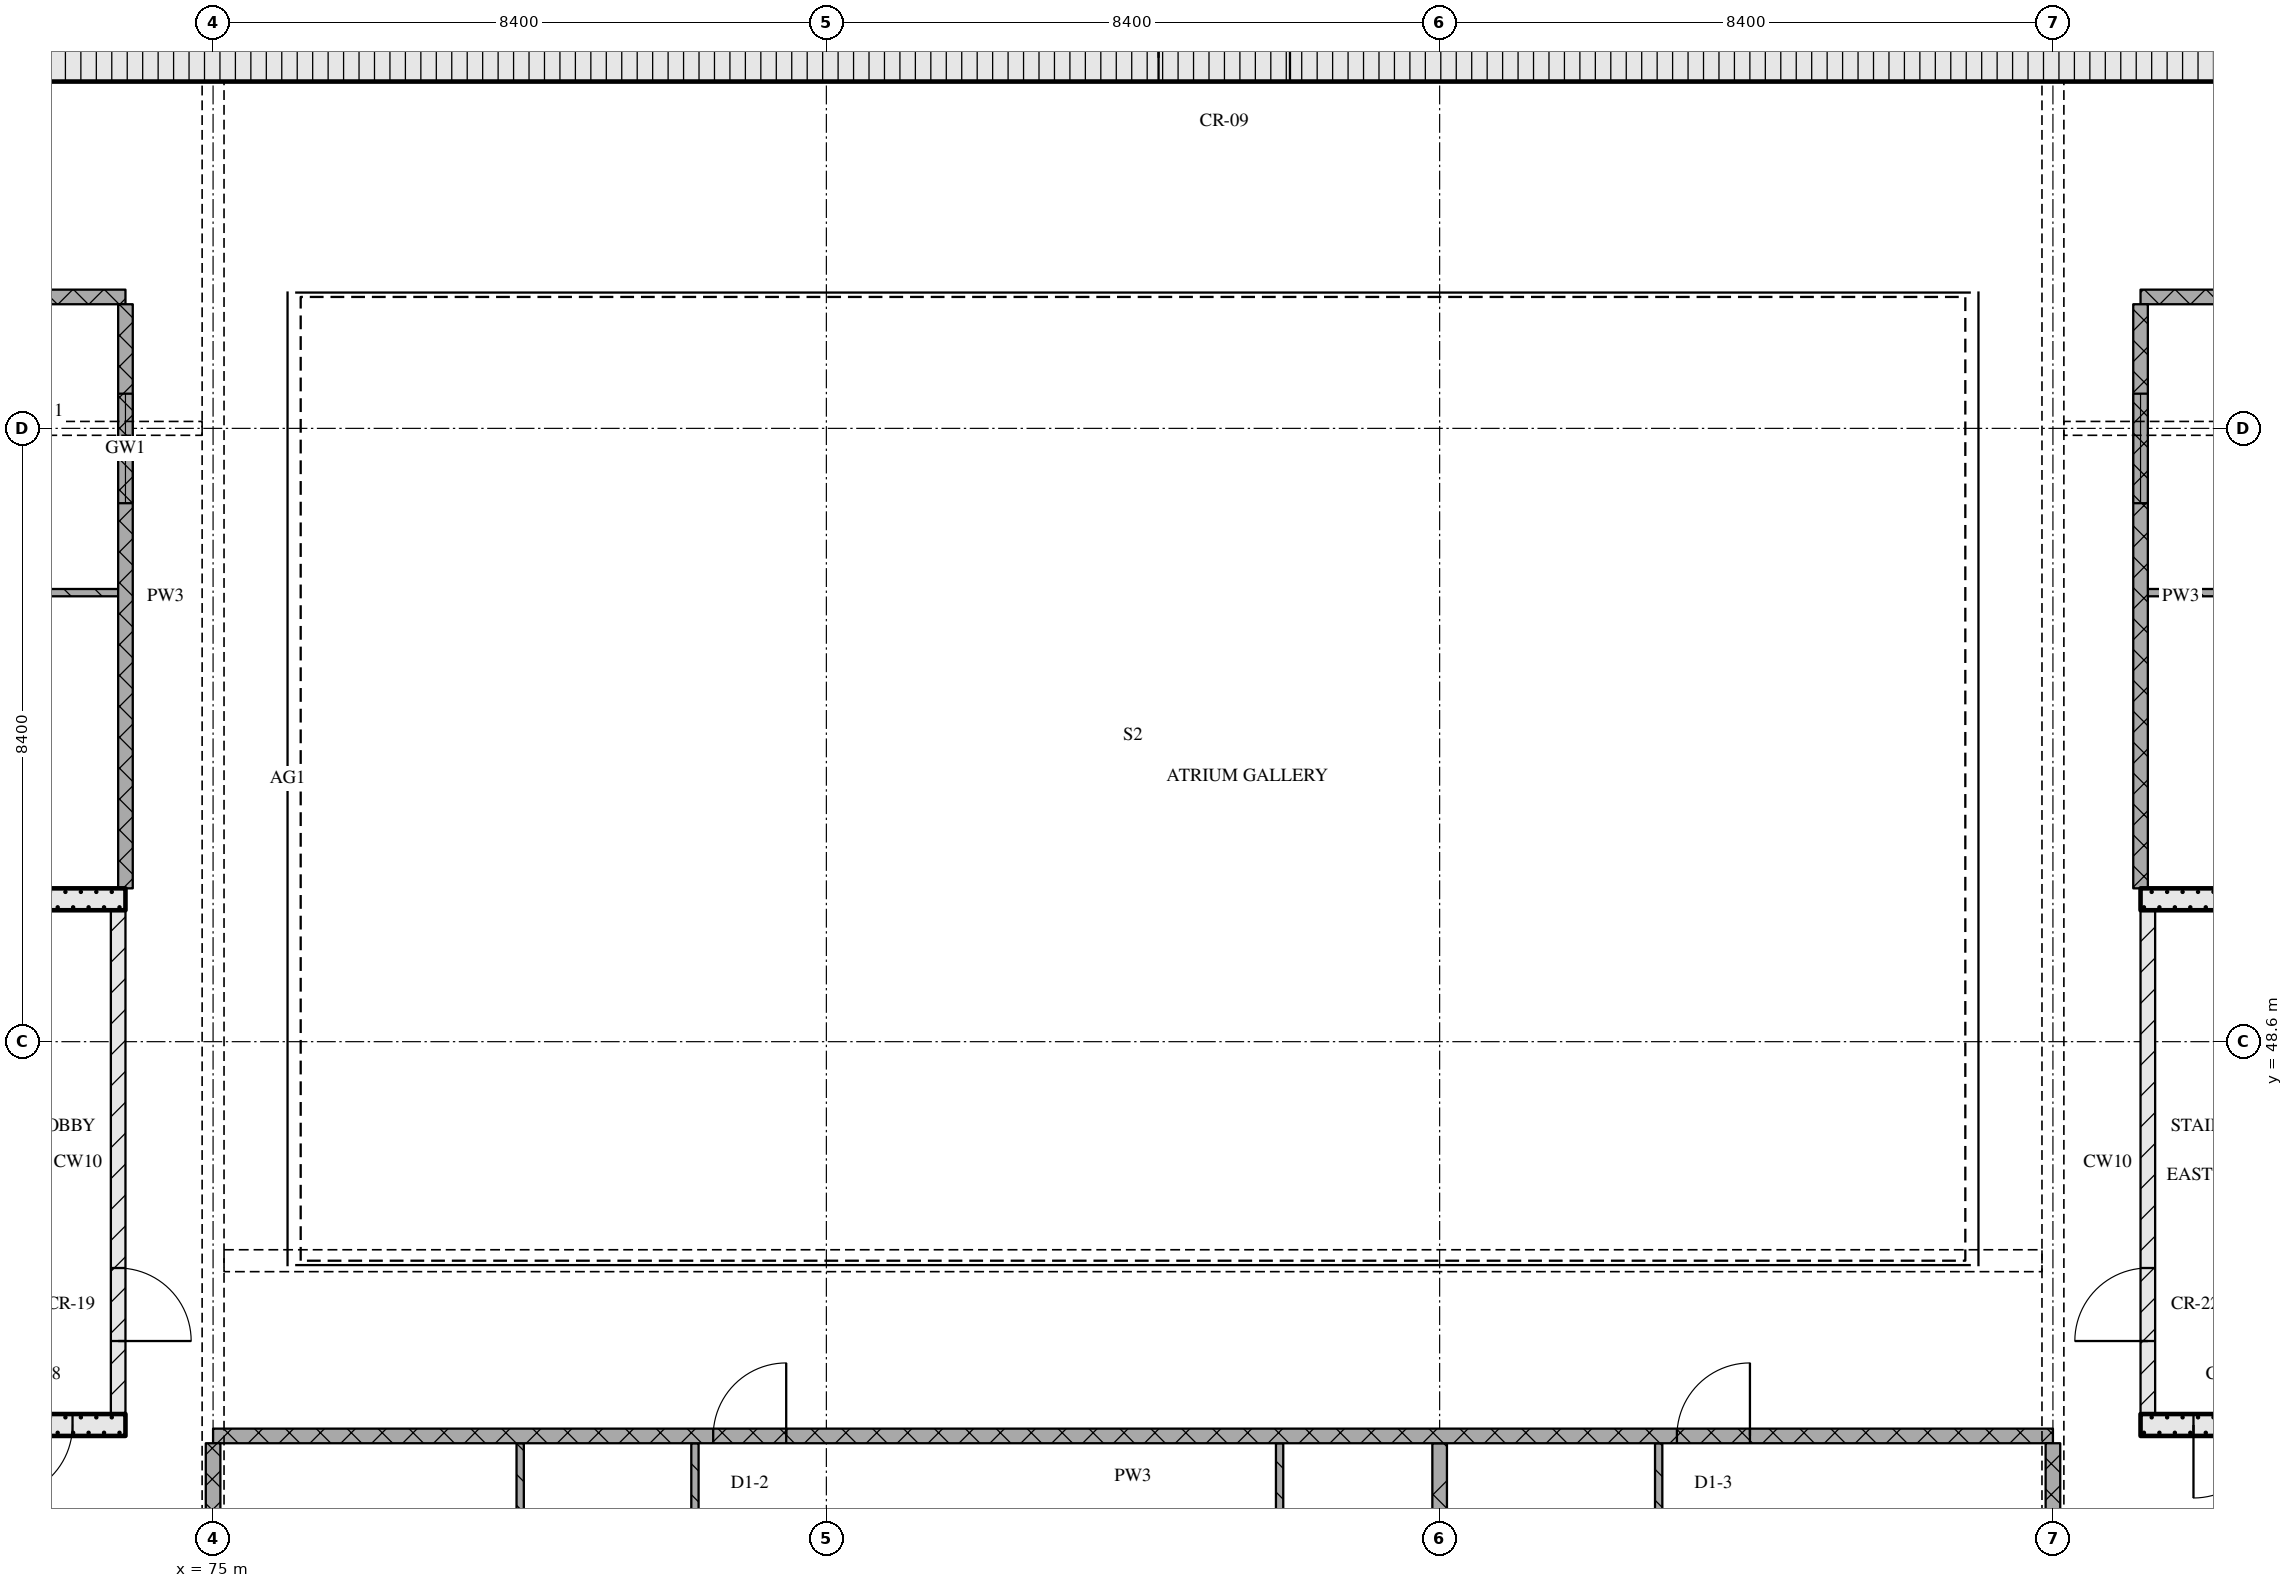
"""IFC4 building model, lengths in metres.
Left out: names, types, materials, properties, quantities, classifications, styles, units other than length and angle.
Written with IfcOpenShell. Run it as: python <this file> out.ifc"""

import sys

from ifc_helpers import new_model, si_unit, direction, frame, frame_2d, origin, place, context, subcontext, project, spatial, rectangle, extrude, element, fill, save


model = new_model("IFC4")
c1 = context("Model", 3, precision=1e-05, world=origin(), true_north=direction((0.0, 1.0)))
c2 = subcontext(c1, "Body", "Model", "MODEL_VIEW")
j1 = project(units=[si_unit("LENGTHUNIT", "METRE"), si_unit("PLANEANGLEUNIT", "RADIAN")], contexts=[c1])
p1 = place(None, origin())
s1 = spatial("IfcSite", under=j1, at=p1, CompositionType="ELEMENT")
p2 = place(p1, origin())
s2 = spatial("IfcBuilding", under=s1, at=p2, CompositionType="ELEMENT")
p3 = place(p2, frame((0.0, 0.0, 205.5)))
s3 = spatial("IfcBuildingStorey", under=s2, at=p3, CompositionType="ELEMENT", Elevation=205.5)
p4 = place(p3, frame((67.15, 62.075, 0.0), z_axis=(0.0, 0.0, 1.0), x_axis=(1.0, 0.0, 0.0)))
e1 = element("IfcWall", 1, at=p4, inside=s3, PredefinedType="SOLIDWALL", context=c2, shape_type="SweptSolid", body=[
    extrude(rectangle(XDim=40.9, YDim=0.65, at=frame_2d((20.45, 0.0))), origin(), (0.0, 0.0, 1.0), 3.32),
])
p5 = place(p4, frame((20.8, 0.0, 0.0)))
e2 = element("IfcOpeningElement", 2, at=p5, cuts=e1, PredefinedType="OPENING", context=c2, shape_type="SweptSolid", body=[
    extrude(rectangle(XDim=1.8, YDim=2.1, at=frame_2d((0.9, 1.05))), frame((0.0, 0.335, 0.0), z_axis=(0.0, -1.0, 0.0), x_axis=(1.0, 0.0, 0.0)), (0.0, 0.0, 1.0), 0.67),
])
p6 = place(p3, frame((68.2, 43.35, 0.0), z_axis=(0.0, 0.0, 1.0), x_axis=(1.0, 0.0, 0.0)))
e3 = element("IfcWall", 3, at=p6, inside=s3, PredefinedType="SOLIDWALL", context=c2, shape_type="SweptSolid", body=[
    extrude(rectangle(XDim=5.6, YDim=0.3, at=frame_2d((2.8, 0.0))), origin(), (0.0, 0.0, 1.0), 3.32),
])
p7 = place(p6, frame((3.875, 0.0, 0.0)))
e4 = element("IfcOpeningElement", 4, at=p7, cuts=e3, PredefinedType="OPENING", context=c2, shape_type="SweptSolid", body=[
    extrude(rectangle(XDim=1.0, YDim=2.1, at=frame_2d((0.5, 1.05))), frame((0.0, 0.16, 0.0), z_axis=(0.0, -1.0, 0.0), x_axis=(1.0, 0.0, 0.0)), (0.0, 0.0, 1.0), 0.32),
])
p8 = place(p3, frame((73.7, 43.5, 0.0), z_axis=(0.0, 0.0, 1.0), x_axis=(0.0, 1.0, 0.0)))
e5 = element("IfcWall", 5, at=p8, inside=s3, PredefinedType="PARTITIONING", context=c2, shape_type="SweptSolid", body=[
    extrude(rectangle(XDim=6.9, YDim=0.2, at=frame_2d((3.45, 0.0))), origin(), (0.0, 0.0, 1.0), 3.32),
])
p9 = place(p8, frame((1.0, 0.0, 0.0)))
e6 = element("IfcOpeningElement", 6, at=p9, cuts=e5, PredefinedType="OPENING", context=c2, shape_type="SweptSolid", body=[
    extrude(rectangle(XDim=1.0, YDim=2.1, at=frame_2d((0.5, 1.05))), frame((0.0, 0.11, 0.0), z_axis=(0.0, -1.0, 0.0), x_axis=(1.0, 0.0, 0.0)), (0.0, 0.0, 1.0), 0.22),
])
p10 = place(p3, frame((68.2, 50.55, 0.0), z_axis=(0.0, 0.0, 1.0), x_axis=(1.0, 0.0, 0.0)))
e7 = element("IfcWall", 7, at=p10, inside=s3, PredefinedType="SOLIDWALL", context=c2, shape_type="SweptSolid", body=[
    extrude(rectangle(XDim=5.6, YDim=0.3, at=frame_2d((2.8, 0.0))), origin(), (0.0, 0.0, 1.0), 3.32),
])
p11 = place(p3, frame((101.4, 43.35, 0.0), z_axis=(0.0, 0.0, 1.0), x_axis=(1.0, 0.0, 0.0)))
e8 = element("IfcWall", 8, at=p11, inside=s3, PredefinedType="SOLIDWALL", context=c2, shape_type="SweptSolid", body=[
    extrude(rectangle(XDim=5.6, YDim=0.3, at=frame_2d((2.8, 0.0))), origin(), (0.0, 0.0, 1.0), 3.32),
])
p12 = place(p11, frame((0.725, 0.0, 0.0)))
e9 = element("IfcOpeningElement", 9, at=p12, cuts=e8, PredefinedType="OPENING", context=c2, shape_type="SweptSolid", body=[
    extrude(rectangle(XDim=1.0, YDim=2.1, at=frame_2d((0.5, 1.05))), frame((0.0, 0.16, 0.0), z_axis=(0.0, -1.0, 0.0), x_axis=(1.0, 0.0, 0.0)), (0.0, 0.0, 1.0), 0.32),
])
p13 = place(p3, frame((101.5, 43.5, 0.0), z_axis=(0.0, 0.0, 1.0), x_axis=(0.0, 1.0, 0.0)))
e10 = element("IfcWall", 10, at=p13, inside=s3, PredefinedType="PARTITIONING", context=c2, shape_type="SweptSolid", body=[
    extrude(rectangle(XDim=6.9, YDim=0.2, at=frame_2d((3.45, 0.0))), origin(), (0.0, 0.0, 1.0), 3.32),
])
p14 = place(p13, frame((1.0, 0.0, 0.0)))
e11 = element("IfcOpeningElement", 11, at=p14, cuts=e10, PredefinedType="OPENING", context=c2, shape_type="SweptSolid", body=[
    extrude(rectangle(XDim=1.0, YDim=2.1, at=frame_2d((0.5, 1.05))), frame((0.0, 0.11, 0.0), z_axis=(0.0, -1.0, 0.0), x_axis=(1.0, 0.0, 0.0)), (0.0, 0.0, 1.0), 0.22),
])
p15 = place(p3, frame((101.4, 50.55, 0.0), z_axis=(0.0, 0.0, 1.0), x_axis=(1.0, 0.0, 0.0)))
e12 = element("IfcWall", 12, at=p15, inside=s3, PredefinedType="SOLIDWALL", context=c2, shape_type="SweptSolid", body=[
    extrude(rectangle(XDim=5.6, YDim=0.3, at=frame_2d((2.8, 0.0))), origin(), (0.0, 0.0, 1.0), 3.32),
])
p16 = place(p3, frame((100.2, 43.2, 0.0), z_axis=(0.0, 0.0, 1.0), x_axis=(-1.0, 0.0, 0.0)))
e13 = element("IfcWall", 13, at=p16, inside=s3, PredefinedType="PARTITIONING", context=c2, shape_type="SweptSolid", body=[
    extrude(rectangle(XDim=25.2, YDim=0.2, at=frame_2d((12.6, 0.0))), origin(), (0.0, 0.0, 1.0), 3.32),
])
p17 = place(p16, frame((4.15, 0.0, 0.0)))
e14 = element("IfcOpeningElement", 14, at=p17, cuts=e13, PredefinedType="OPENING", context=c2, shape_type="SweptSolid", body=[
    extrude(rectangle(XDim=1.0, YDim=2.1, at=frame_2d((0.5, 1.05))), frame((0.0, 0.11, 0.0), z_axis=(0.0, -1.0, 0.0), x_axis=(1.0, 0.0, 0.0)), (0.0, 0.0, 1.0), 0.22),
])
p18 = place(p16, frame((17.35, 0.0, 0.0)))
e15 = element("IfcOpeningElement", 15, at=p18, cuts=e13, PredefinedType="OPENING", context=c2, shape_type="SweptSolid", body=[
    extrude(rectangle(XDim=1.0, YDim=2.1, at=frame_2d((0.5, 1.05))), frame((0.0, 0.11, 0.0), z_axis=(0.0, -1.0, 0.0), x_axis=(1.0, 0.0, 0.0)), (0.0, 0.0, 1.0), 0.22),
])
p19 = place(p3, frame((69.3, 54.75, 0.0), z_axis=(0.0, 0.0, 1.0), x_axis=(1.0, 0.0, 0.0)))
e16 = element("IfcWall", 16, at=p19, inside=s3, PredefinedType="PARTITIONING", context=c2, shape_type="SweptSolid", body=[
    extrude(rectangle(XDim=4.4, YDim=0.1, at=frame_2d((2.2, 0.0))), origin(), (0.0, 0.0, 1.0), 3.32),
])
p20 = place(p3, frame((101.5, 54.75, 0.0), z_axis=(0.0, 0.0, 1.0), x_axis=(1.0, 0.0, 0.0)))
e17 = element("IfcWall", 17, at=p20, inside=s3, PredefinedType="PARTITIONING", context=c2, shape_type="SweptSolid", body=[
    extrude(rectangle(XDim=6.8, YDim=0.1, at=frame_2d((3.4, 0.0))), origin(), (0.0, 0.0, 1.0), 3.32),
])
p21 = place(p20, frame((2.9, 0.0, 0.0)))
e18 = element("IfcOpeningElement", 18, at=p21, cuts=e17, PredefinedType="OPENING", context=c2, shape_type="SweptSolid", body=[
    extrude(rectangle(XDim=0.9, YDim=2.1, at=frame_2d((0.45, 1.05))), frame((0.0, 0.06, 0.0), z_axis=(0.0, -1.0, 0.0), x_axis=(1.0, 0.0, 0.0)), (0.0, 0.0, 1.0), 0.12),
])
for number, where, z_axis, x_axis in (
    (19, (63.0, 58.8, 0.0), (0.0, 0.0, 1.0), (1.0, 0.0, 0.0)),
    (20, (101.4, 58.8, 0.0), (0.0, 0.0, 1.0), (1.0, 0.0, 0.0)),
):
    element("IfcWall", number, at=place(p3, frame(where, z_axis=z_axis, x_axis=x_axis)), inside=s3, PredefinedType="PARTITIONING", context=c2, shape_type="SweptSolid", body=[
        extrude(rectangle(XDim=10.8, YDim=0.2, at=frame_2d((5.4, 0.0))), origin(), (0.0, 0.0, 1.0), 3.32),
    ])
p22 = place(p3, frame((73.8, 58.7, 0.0), z_axis=(0.0, 0.0, 1.0), x_axis=(0.0, -1.0, 0.0)))
e21 = element("IfcWall", 21, at=p22, inside=s3, PredefinedType="PARTITIONING", context=c2, shape_type="SweptSolid", body=[
    extrude(rectangle(XDim=8.0, YDim=0.2, at=frame_2d((4.0, 0.0))), origin(), (0.0, 0.0, 1.0), 3.32),
])
p23 = place(p22, frame((1.225, 0.0, 0.9)))
e22 = element("IfcOpeningElement", 22, at=p23, cuts=e21, PredefinedType="OPENING", context=c2, shape_type="SweptSolid", body=[
    extrude(rectangle(XDim=1.5, YDim=1.5, at=frame_2d((0.75, 0.75))), frame((0.0, 0.11, 0.0), z_axis=(0.0, -1.0, 0.0), x_axis=(1.0, 0.0, 0.0)), (0.0, 0.0, 1.0), 0.22),
])
p24 = place(p3, frame((75.0, 43.1, 0.0), z_axis=(0.0, 0.0, 1.0), x_axis=(0.0, -1.0, 0.0)))
e23 = element("IfcWall", 23, at=p24, inside=s3, PredefinedType="PARTITIONING", context=c2, shape_type="SweptSolid", body=[
    extrude(rectangle(XDim=2.2, YDim=0.2, at=frame_2d((1.1, 0.0))), origin(), (0.0, 0.0, 1.0), 2.53),
])
p25 = place(p3, frame((79.206, 43.1, 0.0), z_axis=(0.0, 0.0, 1.0), x_axis=(0.0, -1.0, 0.0)))
e24 = element("IfcWall", 24, at=p25, inside=s3, PredefinedType="PARTITIONING", context=c2, shape_type="SweptSolid", body=[
    extrude(rectangle(XDim=6.15, YDim=0.1, at=frame_2d((3.075, 0.0))), origin(), (0.0, 0.0, 1.0), 3.32),
])
p26 = place(p3, frame((81.6, 36.95, 0.0), z_axis=(0.0, 0.0, 1.0), x_axis=(0.0, 1.0, 0.0)))
e25 = element("IfcWall", 25, at=p26, inside=s3, PredefinedType="PARTITIONING", context=c2, shape_type="SweptSolid", body=[
    extrude(rectangle(XDim=6.15, YDim=0.1, at=frame_2d((3.075, 0.0))), origin(), (0.0, 0.0, 1.0), 3.32),
])
p27 = place(p26, frame((2.65, 0.0, 0.0)))
e26 = element("IfcOpeningElement", 26, at=p27, cuts=e25, PredefinedType="OPENING", context=c2, shape_type="SweptSolid", body=[
    extrude(rectangle(XDim=0.9, YDim=2.1, at=frame_2d((0.45, 1.05))), frame((0.0, 0.06, 0.0), z_axis=(0.0, -1.0, 0.0), x_axis=(1.0, 0.0, 0.0)), (0.0, 0.0, 1.0), 0.12),
])
p28 = place(p3, frame((89.608, 43.1, 0.0), z_axis=(0.0, 0.0, 1.0), x_axis=(0.0, -1.0, 0.0)))
e27 = element("IfcWall", 27, at=p28, inside=s3, PredefinedType="PARTITIONING", context=c2, shape_type="SweptSolid", body=[
    extrude(rectangle(XDim=6.15, YDim=0.1, at=frame_2d((3.075, 0.0))), origin(), (0.0, 0.0, 1.0), 3.32),
])
p29 = place(p3, frame((91.8, 43.1, 0.0), z_axis=(0.0, 0.0, 1.0), x_axis=(0.0, -1.0, 0.0)))
e28 = element("IfcWall", 28, at=p29, inside=s3, PredefinedType="PARTITIONING", context=c2, shape_type="SweptSolid", body=[
    extrude(rectangle(XDim=2.58, YDim=0.2, at=frame_2d((1.29, 0.0))), origin(), (0.0, 0.0, 1.0), 3.32),
])
p30 = place(p3, frame((94.8, 43.1, 0.0), z_axis=(0.0, 0.0, 1.0), x_axis=(0.0, -1.0, 0.0)))
e29 = element("IfcWall", 29, at=p30, inside=s3, PredefinedType="PARTITIONING", context=c2, shape_type="SweptSolid", body=[
    extrude(rectangle(XDim=5.55, YDim=0.1, at=frame_2d((2.775, 0.0))), origin(), (0.0, 0.0, 1.0), 3.32),
])
p31 = place(p3, frame((100.2, 43.1, 0.0), z_axis=(0.0, 0.0, 1.0), x_axis=(0.0, -1.0, 0.0)))
e30 = element("IfcWall", 30, at=p31, inside=s3, PredefinedType="PARTITIONING", context=c2, shape_type="SweptSolid", body=[
    extrude(rectangle(XDim=2.2, YDim=0.2, at=frame_2d((1.1, 0.0))), origin(), (0.0, 0.0, 1.0), 2.53),
])
p32 = place(p3, frame((101.4, 58.7, 0.0), z_axis=(0.0, 0.0, 1.0), x_axis=(0.0, -1.0, 0.0)))
e31 = element("IfcWall", 31, at=p32, inside=s3, PredefinedType="PARTITIONING", context=c2, shape_type="SweptSolid", body=[
    extrude(rectangle(XDim=8.0, YDim=0.2, at=frame_2d((4.0, 0.0))), origin(), (0.0, 0.0, 1.0), 3.32),
])
p33 = place(p32, frame((1.225, 0.0, 0.9)))
e32 = element("IfcOpeningElement", 32, at=p33, cuts=e31, PredefinedType="OPENING", context=c2, shape_type="SweptSolid", body=[
    extrude(rectangle(XDim=1.5, YDim=1.5, at=frame_2d((0.75, 0.75))), frame((0.0, 0.11, 0.0), z_axis=(0.0, -1.0, 0.0), x_axis=(1.0, 0.0, 0.0)), (0.0, 0.0, 1.0), 0.22),
])
p34 = place(p5, origin())
e33 = element("IfcDoor", 33, at=p34, inside=s3, OperationType="DOUBLE_DOOR_SINGLE_SWING", PredefinedType="DOOR", context=c2, shape_type="SweptSolid", body=[
    extrude(rectangle(XDim=1.8, YDim=2.1, at=frame_2d((0.9, 1.05))), frame((0.0, 0.025, 0.0), z_axis=(0.0, -1.0, 0.0), x_axis=(1.0, 0.0, 0.0)), (0.0, 0.0, 1.0), 0.05),
])
fill(e2, e33)
p35 = place(p7, origin())
e34 = element("IfcDoor", 34, at=p35, inside=s3, OperationType="SINGLE_SWING_RIGHT", PredefinedType="DOOR", context=c2, shape_type="SweptSolid", body=[
    extrude(rectangle(XDim=1.0, YDim=2.1, at=frame_2d((0.5, 1.05))), frame((0.0, 0.025, 0.0), z_axis=(0.0, -1.0, 0.0), x_axis=(1.0, 0.0, 0.0)), (0.0, 0.0, 1.0), 0.05),
])
fill(e4, e34)
p36 = place(p9, origin())
e35 = element("IfcDoor", 35, at=p36, inside=s3, OperationType="SINGLE_SWING_RIGHT", PredefinedType="DOOR", context=c2, shape_type="SweptSolid", body=[
    extrude(rectangle(XDim=1.0, YDim=2.1, at=frame_2d((0.5, 1.05))), frame((0.0, 0.025, 0.0), z_axis=(0.0, -1.0, 0.0), x_axis=(1.0, 0.0, 0.0)), (0.0, 0.0, 1.0), 0.05),
])
fill(e6, e35)
p37 = place(p12, origin())
e36 = element("IfcDoor", 36, at=p37, inside=s3, OperationType="SINGLE_SWING_RIGHT", PredefinedType="DOOR", context=c2, shape_type="SweptSolid", body=[
    extrude(rectangle(XDim=1.0, YDim=2.1, at=frame_2d((0.5, 1.05))), frame((0.0, 0.025, 0.0), z_axis=(0.0, -1.0, 0.0), x_axis=(1.0, 0.0, 0.0)), (0.0, 0.0, 1.0), 0.05),
])
fill(e9, e36)
p38 = place(p14, origin())
e37 = element("IfcDoor", 37, at=p38, inside=s3, OperationType="SINGLE_SWING_LEFT", PredefinedType="DOOR", context=c2, shape_type="SweptSolid", body=[
    extrude(rectangle(XDim=1.0, YDim=2.1, at=frame_2d((0.5, 1.05))), frame((0.0, 0.025, 0.0), z_axis=(0.0, -1.0, 0.0), x_axis=(1.0, 0.0, 0.0)), (0.0, 0.0, 1.0), 0.05),
])
fill(e11, e37)
p39 = place(p17, origin())
e38 = element("IfcDoor", 38, at=p39, inside=s3, OperationType="SINGLE_SWING_RIGHT", PredefinedType="DOOR", context=c2, shape_type="SweptSolid", body=[
    extrude(rectangle(XDim=1.0, YDim=2.1, at=frame_2d((0.5, 1.05))), frame((0.0, 0.025, 0.0), z_axis=(0.0, -1.0, 0.0), x_axis=(1.0, 0.0, 0.0)), (0.0, 0.0, 1.0), 0.05),
])
fill(e14, e38)
p40 = place(p18, origin())
e39 = element("IfcDoor", 39, at=p40, inside=s3, OperationType="SINGLE_SWING_RIGHT", PredefinedType="DOOR", context=c2, shape_type="SweptSolid", body=[
    extrude(rectangle(XDim=1.0, YDim=2.1, at=frame_2d((0.5, 1.05))), frame((0.0, 0.025, 0.0), z_axis=(0.0, -1.0, 0.0), x_axis=(1.0, 0.0, 0.0)), (0.0, 0.0, 1.0), 0.05),
])
fill(e15, e39)
p41 = place(p23, origin())
e40 = element("IfcWindow", 40, at=p41, inside=s3, PartitioningType="SINGLE_PANEL", PredefinedType="WINDOW", context=c2, shape_type="SweptSolid", body=[
    extrude(rectangle(XDim=1.5, YDim=1.5, at=frame_2d((0.75, 0.75))), frame((0.0, 0.03, 0.0), z_axis=(0.0, -1.0, 0.0), x_axis=(1.0, 0.0, 0.0)), (0.0, 0.0, 1.0), 0.06),
])
fill(e22, e40)
p42 = place(p33, origin())
e41 = element("IfcWindow", 41, at=p42, inside=s3, PartitioningType="SINGLE_PANEL", PredefinedType="WINDOW", context=c2, shape_type="SweptSolid", body=[
    extrude(rectangle(XDim=1.5, YDim=1.5, at=frame_2d((0.75, 0.75))), frame((0.0, 0.03, 0.0), z_axis=(0.0, -1.0, 0.0), x_axis=(1.0, 0.0, 0.0)), (0.0, 0.0, 1.0), 0.06),
])
fill(e32, e41)
save(model, sys.argv[1])
